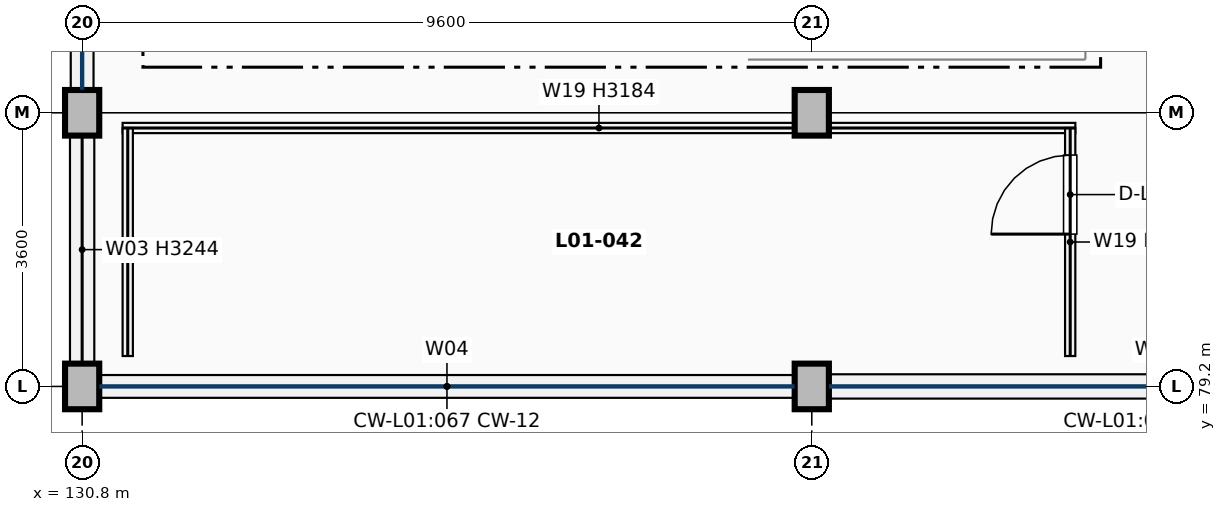
"""IFC4 building model, lengths in metres.
Left out: names, types, materials, properties, quantities, classifications, styles, units other than length and angle.
Written with IfcOpenShell. Run it as: python <this file> out.ifc"""

import sys

from ifc_helpers import new_model, si_unit, direction, frame, frame_2d, origin, origin_2d, place, context, subcontext, project, spatial, rectangle, extrude, element, fill, save


model = new_model("IFC4")
c1 = context("Model", 3, precision=1e-05, world=origin(), true_north=direction((0.0, 1.0)))
c2 = subcontext(c1, "Body", "Model", "MODEL_VIEW")
j1 = project(units=[si_unit("LENGTHUNIT", "METRE"), si_unit("PLANEANGLEUNIT", "RADIAN")], contexts=[c1])
p1 = place(None, origin())
s1 = spatial("IfcSite", under=j1, at=p1, CompositionType="ELEMENT")
p2 = place(p1, origin())
s2 = spatial("IfcBuilding", under=s1, at=p2, CompositionType="ELEMENT")
p3 = place(p2, frame((0.0, 0.0, 5.1)))
s3 = spatial("IfcBuildingStorey", under=s2, at=p3, CompositionType="ELEMENT", Elevation=5.1)
for number, where, z_axis, x_axis in (
    (1, (130.8, 79.2, 0.0), (0.0, 0.0, 1.0), (1.0, 0.0, 0.0)),
    (2, (130.8, 82.8, 0.0), (0.0, 0.0, 1.0), (1.0, 0.0, 0.0)),
    (3, (140.4, 79.2, 0.0), (0.0, 0.0, 1.0), (1.0, 0.0, 0.0)),
    (4, (140.4, 82.8, 0.0), (0.0, 0.0, 1.0), (1.0, 0.0, 0.0)),
):
    element("IfcColumn", number, at=place(p3, frame(where, z_axis=z_axis, x_axis=x_axis)), inside=s3, PredefinedType="COLUMN", context=c2, shape_type="SweptSolid", body=[
        extrude(rectangle(XDim=0.45, YDim=0.6, at=origin_2d()), origin(), (0.0, 0.0, 1.0), 4.42),
    ])
p4 = place(p3, frame((131.027, 79.2, 0.0), z_axis=(0.0, 0.0, 1.0), x_axis=(1.0, 0.0, 0.0)))
e5 = element("IfcWall", 5, at=p4, inside=s3, PredefinedType="SOLIDWALL", context=c2, shape_type="SweptSolid", body=[
    extrude(rectangle(XDim=9.146, YDim=0.3, at=frame_2d((4.573, 0.0))), origin(), (0.0, 0.0, 1.0), 0.85),
])
p5 = place(p3, frame((140.627, 79.2, 0.0), z_axis=(0.0, 0.0, 1.0), x_axis=(1.0, 0.0, 0.0)))
e6 = element("IfcWall", 6, at=p5, inside=s3, PredefinedType="SOLIDWALL", context=c2, shape_type="SweptSolid", body=[
    extrude(rectangle(XDim=8.621, YDim=0.32, at=frame_2d((4.311, 0.0))), origin(), (0.0, 0.0, 1.0), 0.85),
])
p6 = place(p3, frame((130.8, 79.502, 0.0), z_axis=(0.0, 0.0, 1.0), x_axis=(0.0, 1.0, 0.0)))
e7 = element("IfcWall", 7, at=p6, inside=s3, PredefinedType="SOLIDWALL", context=c2, shape_type="SweptSolid", body=[
    extrude(rectangle(XDim=2.996, YDim=0.32, at=frame_2d((1.498, 0.0))), origin(), (0.0, 0.0, 1.0), 3.244),
])
p7 = place(p3, frame((130.8, 83.102, 0.0), z_axis=(0.0, 0.0, 1.0), x_axis=(0.0, 1.0, 0.0)))
e8 = element("IfcWall", 8, at=p7, inside=s3, PredefinedType="SOLIDWALL", context=c2, shape_type="SweptSolid", body=[
    extrude(rectangle(XDim=6.596, YDim=0.3, at=frame_2d((3.298, 0.0))), origin(), (0.0, 0.0, 1.0), 0.85),
])
p8 = place(p3, frame((144.0, 83.5, 0.0), z_axis=(0.0, 0.0, 1.0), x_axis=(0.0, 1.0, 0.0)))
e9 = element("IfcWall", 9, at=p8, inside=s3, PredefinedType="PARTITIONING", context=c2, shape_type="SweptSolid", body=[
    extrude(rectangle(XDim=3.0, YDim=0.2, at=frame_2d((1.5, 0.0))), origin(), (0.0, 0.0, 1.0), 3.184),
])
p9 = place(p8, frame((0.775, 0.0, 0.0)))
e10 = element("IfcOpeningElement", 10, at=p9, cuts=e9, PredefinedType="OPENING", context=c2, shape_type="SweptSolid", body=[
    extrude(rectangle(XDim=1.45, YDim=2.2, at=frame_2d((0.725, 1.1))), frame((0.0, 0.11, 0.0), z_axis=(0.0, -1.0, 0.0), x_axis=(1.0, 0.0, 0.0)), (0.0, 0.0, 1.0), 0.22),
])
p10 = place(p3, frame((139.56, 83.5, 0.0), z_axis=(0.0, 0.0, 1.0), x_axis=(1.0, 0.0, 0.0)))
e11 = element("IfcWall", 11, at=p10, inside=s3, PredefinedType="PARTITIONING", context=c2, shape_type="SweptSolid", body=[
    extrude(rectangle(XDim=4.44, YDim=0.2, at=frame_2d((2.22, 0.0))), origin(), (0.0, 0.0, 1.0), 3.184),
])
p11 = place(p3, frame((131.333, 82.6, 0.0), z_axis=(0.0, 0.0, 1.0), x_axis=(1.0, 0.0, 0.0)))
e12 = element("IfcWall", 12, at=p11, inside=s3, PredefinedType="PARTITIONING", context=c2, shape_type="SweptSolid", body=[
    extrude(rectangle(XDim=12.535, YDim=0.135, at=frame_2d((6.268, 0.0))), origin(), (0.0, 0.0, 1.0), 3.184),
])
p12 = place(p3, frame((131.4, 79.6, 0.0), z_axis=(0.0, 0.0, 1.0), x_axis=(0.0, 1.0, 0.0)))
e13 = element("IfcWall", 13, at=p12, inside=s3, PredefinedType="PARTITIONING", context=c2, shape_type="SweptSolid", body=[
    extrude(rectangle(XDim=3.0, YDim=0.135, at=frame_2d((1.5, 0.0))), origin(), (0.0, 0.0, 1.0), 3.244),
])
p13 = place(p3, frame((143.8, 79.6, 0.0), z_axis=(0.0, 0.0, 1.0), x_axis=(0.0, 1.0, 0.0)))
e14 = element("IfcWall", 14, at=p13, inside=s3, PredefinedType="PARTITIONING", context=c2, shape_type="SweptSolid", body=[
    extrude(rectangle(XDim=3.0, YDim=0.135, at=frame_2d((1.5, 0.0))), origin(), (0.0, 0.0, 1.0), 3.244),
])
p14 = place(p13, frame((1.604, 0.0, 0.0)))
e15 = element("IfcOpeningElement", 15, at=p14, cuts=e14, PredefinedType="OPENING", context=c2, shape_type="SweptSolid", body=[
    extrude(rectangle(XDim=1.04, YDim=2.12, at=frame_2d((0.52, 1.06))), frame((0.0, 0.078, 0.0), z_axis=(0.0, -1.0, 0.0), x_axis=(1.0, 0.0, 0.0)), (0.0, 0.0, 1.0), 0.155),
])
p15 = place(p14, origin())
e16 = element("IfcDoor", 16, at=p15, inside=s3, OperationType="SINGLE_SWING_LEFT", PredefinedType="DOOR", context=c2, shape_type="SweptSolid", body=[
    extrude(rectangle(XDim=1.04, YDim=2.12, at=frame_2d((0.52, 1.06))), frame((0.0, 0.025, 0.0), z_axis=(0.0, -1.0, 0.0), x_axis=(1.0, 0.0, 0.0)), (0.0, 0.0, 1.0), 0.05),
])
fill(e15, e16)
save(model, sys.argv[1])
